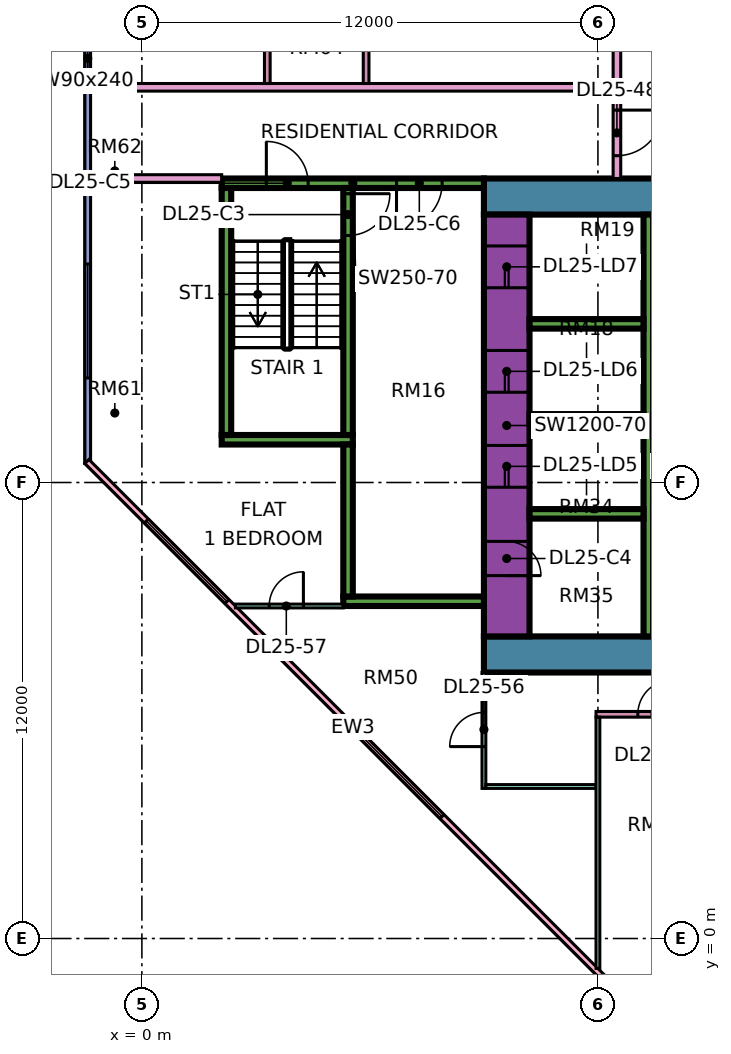
"""IFC4 building model, lengths in metres.
Left out: names, types, materials, properties, quantities, classifications, styles, units other than length and angle.
Written with IfcOpenShell. Run it as: python <this file> out.ifc"""

import sys

from ifc_helpers import new_model, si_unit, direction, frame, frame_2d, origin, place, context, subcontext, project, spatial, rectangle, extrude, element, fill, save


model = new_model("IFC4")
c1 = context("Model", 3, precision=1e-05, world=origin(), true_north=direction((0.0, 1.0)))
c2 = subcontext(c1, "Body", "Model", "MODEL_VIEW")
j1 = project(units=[si_unit("LENGTHUNIT", "METRE"), si_unit("PLANEANGLEUNIT", "RADIAN")], contexts=[c1])
p1 = place(None, origin())
s1 = spatial("IfcSite", under=j1, at=p1, CompositionType="ELEMENT")
p2 = place(p1, origin())
s2 = spatial("IfcBuilding", under=s1, at=p2, CompositionType="ELEMENT")
p3 = place(p2, frame((0.0, 0.0, 110.65)))
s3 = spatial("IfcBuildingStorey", under=s2, at=p3, CompositionType="ELEMENT", Elevation=110.65)
p4 = place(p3, frame((9.0, 7.475, 0.0), z_axis=(0.0, 0.0, 1.0), x_axis=(1.0, 0.0, 0.0)))
e1 = element("IfcWall", 1, at=p4, inside=s3, PredefinedType="SHEAR", context=c2, shape_type="SweptSolid", body=[
    extrude(rectangle(XDim=25.0, YDim=0.95, at=frame_2d((12.5, 0.0))), origin(), (0.0, 0.0, 1.0), 3.75),
])
p5 = place(p3, frame((9.0, 19.525, 0.0), z_axis=(0.0, 0.0, 1.0), x_axis=(1.0, 0.0, 0.0)))
e2 = element("IfcWall", 2, at=p5, inside=s3, PredefinedType="SHEAR", context=c2, shape_type="SweptSolid", body=[
    extrude(rectangle(XDim=25.0, YDim=0.95, at=frame_2d((12.5, 0.0))), origin(), (0.0, 0.0, 1.0), 3.75),
])
p6 = place(p5, frame((19.1, 0.0, 0.0)))
e3 = element("IfcOpeningElement", 3, at=p6, cuts=e2, PredefinedType="OPENING", context=c2, shape_type="SweptSolid", body=[
    extrude(rectangle(XDim=1.8, YDim=2.4, at=frame_2d((0.9, 1.2))), frame((0.0, 0.485, 0.0), z_axis=(0.0, -1.0, 0.0), x_axis=(1.0, 0.0, 0.0)), (0.0, 0.0, 1.0), 0.97),
])
p7 = place(p3, frame((9.6, 7.95, 0.0), z_axis=(0.0, 0.0, 1.0), x_axis=(0.0, 1.0, 0.0)))
e4 = element("IfcWall", 4, at=p7, inside=s3, PredefinedType="SHEAR", context=c2, shape_type="SweptSolid", body=[
    extrude(rectangle(XDim=11.1, YDim=1.2, at=frame_2d((5.55, 0.0))), origin(), (0.0, 0.0, 1.0), 3.75),
])
p8 = place(p7, frame((3.925, 0.0, 0.0)))
e5 = element("IfcOpeningElement", 5, at=p8, cuts=e4, PredefinedType="OPENING", context=c2, shape_type="SweptSolid", body=[
    extrude(rectangle(XDim=1.1, YDim=2.2, at=frame_2d((0.55, 1.1))), frame((0.0, 0.61, 0.0), z_axis=(0.0, -1.0, 0.0), x_axis=(1.0, 0.0, 0.0)), (0.0, 0.0, 1.0), 1.22),
])
p9 = place(p7, frame((6.425, 0.0, 0.0)))
e6 = element("IfcOpeningElement", 6, at=p9, cuts=e4, PredefinedType="OPENING", context=c2, shape_type="SweptSolid", body=[
    extrude(rectangle(XDim=1.1, YDim=2.2, at=frame_2d((0.55, 1.1))), frame((0.0, 0.61, 0.0), z_axis=(0.0, -1.0, 0.0), x_axis=(1.0, 0.0, 0.0)), (0.0, 0.0, 1.0), 1.22),
])
p10 = place(p7, frame((9.175, 0.0, 0.0)))
e7 = element("IfcOpeningElement", 7, at=p10, cuts=e4, PredefinedType="OPENING", context=c2, shape_type="SweptSolid", body=[
    extrude(rectangle(XDim=1.1, YDim=2.2, at=frame_2d((0.55, 1.1))), frame((0.0, 0.61, 0.0), z_axis=(0.0, -1.0, 0.0), x_axis=(1.0, 0.0, 0.0)), (0.0, 0.0, 1.0), 1.22),
])
p11 = place(p7, frame((1.6, 0.0, 0.0)))
e8 = element("IfcOpeningElement", 8, at=p11, cuts=e4, PredefinedType="OPENING", context=c2, shape_type="SweptSolid", body=[
    extrude(rectangle(XDim=0.9, YDim=2.1, at=frame_2d((0.45, 1.05))), frame((0.0, 0.61, 0.0), z_axis=(0.0, -1.0, 0.0), x_axis=(1.0, 0.0, 0.0)), (0.0, 0.0, 1.0), 1.22),
])
p12 = place(p3, frame((13.325, 7.95, 0.0), z_axis=(0.0, 0.0, 1.0), x_axis=(0.0, 1.0, 0.0)))
e9 = element("IfcWall", 9, at=p12, inside=s3, PredefinedType="SHEAR", context=c2, shape_type="SweptSolid", body=[
    extrude(rectangle(XDim=11.1, YDim=0.25, at=frame_2d((5.55, 0.0))), origin(), (0.0, 0.0, 1.0), 3.75),
])
for number, where, z_axis, x_axis in (
    (10, (10.2, 11.175, 0.0), (0.0, 0.0, 1.0), (1.0, 0.0, 0.0)),
    (11, (10.2, 13.675, 0.0), (0.0, 0.0, 1.0), (1.0, 0.0, 0.0)),
    (12, (10.2, 16.175, 0.0), (0.0, 0.0, 1.0), (1.0, 0.0, 0.0)),
):
    element("IfcWall", number, at=place(p3, frame(where, z_axis=z_axis, x_axis=x_axis)), inside=s3, PredefinedType="SHEAR", context=c2, shape_type="SweptSolid", body=[
        extrude(rectangle(XDim=3.0, YDim=0.25, at=frame_2d((1.5, 0.0))), origin(), (0.0, 0.0, 1.0), 3.75),
    ])
p13 = place(p3, frame((2.1, 19.875, 0.0), z_axis=(0.0, 0.0, 1.0), x_axis=(1.0, 0.0, 0.0)))
e13 = element("IfcWall", 13, at=p13, inside=s3, PredefinedType="SHEAR", context=c2, shape_type="SweptSolid", body=[
    extrude(rectangle(XDim=6.9, YDim=0.25, at=frame_2d((3.45, 0.0))), origin(), (0.0, 0.0, 1.0), 3.75),
])
p14 = place(p13, frame((1.175, 0.0, 0.0)))
e14 = element("IfcOpeningElement", 14, at=p14, cuts=e13, PredefinedType="OPENING", context=c2, shape_type="SweptSolid", body=[
    extrude(rectangle(XDim=1.1, YDim=2.2, at=frame_2d((0.55, 1.1))), frame((0.0, 0.135, 0.0), z_axis=(0.0, -1.0, 0.0), x_axis=(1.0, 0.0, 0.0)), (0.0, 0.0, 1.0), 0.27),
])
p15 = place(p13, frame((4.6, 0.0, 0.0)))
e15 = element("IfcOpeningElement", 15, at=p15, cuts=e13, PredefinedType="OPENING", context=c2, shape_type="SweptSolid", body=[
    extrude(rectangle(XDim=1.2, YDim=2.2, at=frame_2d((0.6, 1.1))), frame((0.0, 0.135, 0.0), z_axis=(0.0, -1.0, 0.0), x_axis=(1.0, 0.0, 0.0)), (0.0, 0.0, 1.0), 0.27),
])
p16 = place(p3, frame((2.1, 13.125, 0.0), z_axis=(0.0, 0.0, 1.0), x_axis=(1.0, 0.0, 0.0)))
e16 = element("IfcWall", 16, at=p16, inside=s3, PredefinedType="SHEAR", context=c2, shape_type="SweptSolid", body=[
    extrude(rectangle(XDim=3.45, YDim=0.25, at=frame_2d((1.725, 0.0))), origin(), (0.0, 0.0, 1.0), 3.75),
])
p17 = place(p3, frame((2.225, 13.25, 0.0), z_axis=(0.0, 0.0, 1.0), x_axis=(0.0, 1.0, 0.0)))
e17 = element("IfcWall", 17, at=p17, inside=s3, PredefinedType="SHEAR", context=c2, shape_type="SweptSolid", body=[
    extrude(rectangle(XDim=6.5, YDim=0.25, at=frame_2d((3.25, 0.0))), origin(), (0.0, 0.0, 1.0), 3.75),
])
p18 = place(p3, frame((5.425, 13.25, 0.0), z_axis=(0.0, 0.0, 1.0), x_axis=(0.0, 1.0, 0.0)))
e18 = element("IfcWall", 18, at=p18, inside=s3, PredefinedType="SHEAR", context=c2, shape_type="SweptSolid", body=[
    extrude(rectangle(XDim=6.5, YDim=0.25, at=frame_2d((3.25, 0.0))), origin(), (0.0, 0.0, 1.0), 3.75),
])
p19 = place(p18, frame((5.25, 0.0, 0.0)))
e19 = element("IfcOpeningElement", 19, at=p19, cuts=e18, PredefinedType="OPENING", context=c2, shape_type="SweptSolid", body=[
    extrude(rectangle(XDim=1.1, YDim=2.2, at=frame_2d((0.55, 1.1))), frame((0.0, 0.135, 0.0), z_axis=(0.0, -1.0, 0.0), x_axis=(1.0, 0.0, 0.0)), (0.0, 0.0, 1.0), 0.27),
])
p20 = place(p3, frame((5.3, 8.875, 0.0), z_axis=(0.0, 0.0, 1.0), x_axis=(1.0, 0.0, 0.0)))
e20 = element("IfcWall", 20, at=p20, inside=s3, PredefinedType="SHEAR", context=c2, shape_type="SweptSolid", body=[
    extrude(rectangle(XDim=3.7, YDim=0.25, at=frame_2d((1.85, 0.0))), origin(), (0.0, 0.0, 1.0), 3.75),
])
p21 = place(p3, frame((5.425, 9.0, 0.0), z_axis=(0.0, 0.0, 1.0), x_axis=(0.0, 1.0, 0.0)))
e21 = element("IfcWall", 21, at=p21, inside=s3, PredefinedType="SHEAR", context=c2, shape_type="SweptSolid", body=[
    extrude(rectangle(XDim=4.0, YDim=0.25, at=frame_2d((2.0, 0.0))), origin(), (0.0, 0.0, 1.0), 3.75),
])
p22 = place(p3, frame((-1.425, 23.925, 0.0), z_axis=(0.0, 0.0, 1.0), x_axis=(0.0, -1.0, 0.0)))
e22 = element("IfcWall", 22, at=p22, inside=s3, PredefinedType="SOLIDWALL", context=c2, shape_type="SweptSolid", body=[
    extrude(rectangle(XDim=11.425, YDim=0.15, at=frame_2d((5.712, 0.0))), origin(), (0.0, 0.0, 1.0), 3.35),
])
p23 = place(p22, frame((0.312, 0.0, 0.45)))
e23 = element("IfcOpeningElement", 23, at=p23, cuts=e22, PredefinedType="OPENING", context=c2, shape_type="SweptSolid", body=[
    extrude(rectangle(XDim=0.9, YDim=2.4, at=frame_2d((0.45, 1.2))), frame((0.0, 0.085, 0.0), z_axis=(0.0, -1.0, 0.0), x_axis=(1.0, 0.0, 0.0)), (0.0, 0.0, 1.0), 0.17),
])
p24 = place(p22, frame((6.175, 0.0, 0.45)))
e24 = element("IfcOpeningElement", 24, at=p24, cuts=e22, PredefinedType="OPENING", context=c2, shape_type="SweptSolid", body=[
    extrude(rectangle(XDim=3.0, YDim=2.4, at=frame_2d((1.5, 1.2))), frame((0.0, 0.085, 0.0), z_axis=(0.0, -1.0, 0.0), x_axis=(1.0, 0.0, 0.0)), (0.0, 0.0, 1.0), 0.17),
])
p25 = place(p3, frame((-1.447, 12.553, 0.0), z_axis=(0.0, 0.0, 1.0), x_axis=(0.707106781187, -0.707106781187, 0.0)))
e25 = element("IfcWall", 25, at=p25, inside=s3, PredefinedType="SOLIDWALL", context=c2, shape_type="SweptSolid", body=[
    extrude(rectangle(XDim=19.799, YDim=0.15, at=frame_2d((9.899, 0.0))), origin(), (0.0, 0.0, 1.0), 3.35),
])
p26 = place(p25, frame((2.212, 0.0, 0.45)))
e26 = element("IfcOpeningElement", 26, at=p26, cuts=e25, PredefinedType="OPENING", context=c2, shape_type="SweptSolid", body=[
    extrude(rectangle(XDim=3.0, YDim=2.4, at=frame_2d((1.5, 1.2))), frame((0.0, 0.085, 0.0), z_axis=(0.0, -1.0, 0.0), x_axis=(1.0, 0.0, 0.0)), (0.0, 0.0, 1.0), 0.17),
])
p27 = place(p25, frame((10.216, 0.0, 0.45)))
e27 = element("IfcOpeningElement", 27, at=p27, cuts=e25, PredefinedType="OPENING", context=c2, shape_type="SweptSolid", body=[
    extrude(rectangle(XDim=3.0, YDim=2.4, at=frame_2d((1.5, 1.2))), frame((0.0, 0.085, 0.0), z_axis=(0.0, -1.0, 0.0), x_axis=(1.0, 0.0, 0.0)), (0.0, 0.0, 1.0), 0.17),
])
p28 = place(p3, frame((-1.35, 20.0, 0.0), z_axis=(0.0, 0.0, 1.0), x_axis=(1.0, 0.0, 0.0)))
e28 = element("IfcWall", 28, at=p28, inside=s3, PredefinedType="PARTITIONING", context=c2, shape_type="SweptSolid", body=[
    extrude(rectangle(XDim=3.45, YDim=0.2, at=frame_2d((1.725, 0.0))), origin(), (0.0, 0.0, 1.0), 3.35),
])
p29 = place(p3, frame((-1.35, 22.4, 0.0), z_axis=(0.0, 0.0, 1.0), x_axis=(1.0, 0.0, 0.0)))
e29 = element("IfcWall", 29, at=p29, inside=s3, PredefinedType="PARTITIONING", context=c2, shape_type="SweptSolid", body=[
    extrude(rectangle(XDim=13.75, YDim=0.2, at=frame_2d((6.875, 0.0))), origin(), (0.0, 0.0, 1.0), 3.35),
])
p30 = place(p3, frame((2.461, 8.75, 0.0), z_axis=(0.0, 0.0, 1.0), x_axis=(1.0, 0.0, 0.0)))
e30 = element("IfcWall", 30, at=p30, inside=s3, PredefinedType="PARTITIONING", context=c2, shape_type="SweptSolid", body=[
    extrude(rectangle(XDim=2.839, YDim=0.1, at=frame_2d((1.419, 0.0))), origin(), (0.0, 0.0, 1.0), 3.35),
])
p31 = place(p30, frame((0.889, 0.0, 0.0)))
e31 = element("IfcOpeningElement", 31, at=p31, cuts=e30, PredefinedType="OPENING", context=c2, shape_type="SweptSolid", body=[
    extrude(rectangle(XDim=0.9, YDim=2.1, at=frame_2d((0.45, 1.05))), frame((0.0, 0.06, 0.0), z_axis=(0.0, -1.0, 0.0), x_axis=(1.0, 0.0, 0.0)), (0.0, 0.0, 1.0), 0.12),
])
p32 = place(p3, frame((3.3, 22.5, 0.0), z_axis=(0.0, 0.0, 1.0), x_axis=(0.0, 1.0, 0.0)))
e32 = element("IfcWall", 32, at=p32, inside=s3, PredefinedType="PARTITIONING", context=c2, shape_type="SweptSolid", body=[
    extrude(rectangle(XDim=2.975, YDim=0.15, at=frame_2d((1.488, 0.0))), origin(), (0.0, 0.0, 1.0), 3.35),
])
p33 = place(p3, frame((5.9, 22.5, 0.0), z_axis=(0.0, 0.0, 1.0), x_axis=(0.0, 1.0, 0.0)))
e33 = element("IfcWall", 33, at=p33, inside=s3, PredefinedType="PARTITIONING", context=c2, shape_type="SweptSolid", body=[
    extrude(rectangle(XDim=7.55, YDim=0.15, at=frame_2d((3.775, 0.0))), origin(), (0.0, 0.0, 1.0), 3.35),
])
p34 = place(p3, frame((9.0, 3.95, 0.0), z_axis=(0.0, 0.0, 1.0), x_axis=(0.0, 1.0, 0.0)))
e34 = element("IfcWall", 34, at=p34, inside=s3, PredefinedType="PARTITIONING", context=c2, shape_type="SweptSolid", body=[
    extrude(rectangle(XDim=3.05, YDim=0.1, at=frame_2d((1.525, 0.0))), origin(), (0.0, 0.0, 1.0), 3.35),
])
p35 = place(p34, frame((1.1, 0.0, 0.0)))
e35 = element("IfcOpeningElement", 35, at=p35, cuts=e34, PredefinedType="OPENING", context=c2, shape_type="SweptSolid", body=[
    extrude(rectangle(XDim=0.9, YDim=2.1, at=frame_2d((0.45, 1.05))), frame((0.0, 0.06, 0.0), z_axis=(0.0, -1.0, 0.0), x_axis=(1.0, 0.0, 0.0)), (0.0, 0.0, 1.0), 0.12),
])
p36 = place(p3, frame((9.05, 4.0, 0.0), z_axis=(0.0, 0.0, 1.0), x_axis=(1.0, 0.0, 0.0)))
e36 = element("IfcWall", 36, at=p36, inside=s3, PredefinedType="PARTITIONING", context=c2, shape_type="SweptSolid", body=[
    extrude(rectangle(XDim=2.9, YDim=0.1, at=frame_2d((1.45, 0.0))), origin(), (0.0, 0.0, 1.0), 3.35),
])
p37 = place(p3, frame((11.95, 5.9, 0.0), z_axis=(0.0, 0.0, 1.0), x_axis=(1.0, 0.0, 0.0)))
e37 = element("IfcWall", 37, at=p37, inside=s3, PredefinedType="PARTITIONING", context=c2, shape_type="SweptSolid", body=[
    extrude(rectangle(XDim=21.1, YDim=0.15, at=frame_2d((10.55, 0.0))), origin(), (0.0, 0.0, 1.0), 3.35),
])
p38 = place(p37, frame((1.1, 0.0, 0.0)))
e38 = element("IfcOpeningElement", 38, at=p38, cuts=e37, PredefinedType="OPENING", context=c2, shape_type="SweptSolid", body=[
    extrude(rectangle(XDim=0.9, YDim=2.1, at=frame_2d((0.45, 1.05))), frame((0.0, 0.085, 0.0), z_axis=(0.0, -1.0, 0.0), x_axis=(1.0, 0.0, 0.0)), (0.0, 0.0, 1.0), 0.17),
])
p39 = place(p37, frame((4.1, 0.0, 0.0)))
e39 = element("IfcOpeningElement", 39, at=p39, cuts=e37, PredefinedType="OPENING", context=c2, shape_type="SweptSolid", body=[
    extrude(rectangle(XDim=0.9, YDim=2.1, at=frame_2d((0.45, 1.05))), frame((0.0, 0.085, 0.0), z_axis=(0.0, -1.0, 0.0), x_axis=(1.0, 0.0, 0.0)), (0.0, 0.0, 1.0), 0.17),
])
p40 = place(p37, frame((10.1, 0.0, 0.0)))
e40 = element("IfcOpeningElement", 40, at=p40, cuts=e37, PredefinedType="OPENING", context=c2, shape_type="SweptSolid", body=[
    extrude(rectangle(XDim=0.9, YDim=2.1, at=frame_2d((0.45, 1.05))), frame((0.0, 0.085, 0.0), z_axis=(0.0, -1.0, 0.0), x_axis=(1.0, 0.0, 0.0)), (0.0, 0.0, 1.0), 0.17),
])
p41 = place(p37, frame((16.1, 0.0, 0.0)))
e41 = element("IfcOpeningElement", 41, at=p41, cuts=e37, PredefinedType="OPENING", context=c2, shape_type="SweptSolid", body=[
    extrude(rectangle(XDim=0.9, YDim=2.1, at=frame_2d((0.45, 1.05))), frame((0.0, 0.085, 0.0), z_axis=(0.0, -1.0, 0.0), x_axis=(1.0, 0.0, 0.0)), (0.0, 0.0, 1.0), 0.17),
])
p42 = place(p3, frame((12.0, -0.788, 0.0), z_axis=(0.0, 0.0, 1.0), x_axis=(0.0, 1.0, 0.0)))
e42 = element("IfcWall", 42, at=p42, inside=s3, PredefinedType="PARTITIONING", context=c2, shape_type="SweptSolid", body=[
    extrude(rectangle(XDim=6.613, YDim=0.1, at=frame_2d((3.306, 0.0))), origin(), (0.0, 0.0, 1.0), 3.35),
])
p43 = place(p3, frame((12.5, 20.0, 0.0), z_axis=(0.0, 0.0, 1.0), x_axis=(0.0, 1.0, 0.0)))
e43 = element("IfcWall", 43, at=p43, inside=s3, PredefinedType="PARTITIONING", context=c2, shape_type="SweptSolid", body=[
    extrude(rectangle(XDim=43.0, YDim=0.2, at=frame_2d((21.5, 0.0))), origin(), (0.0, 0.0, 1.0), 3.35),
])
p44 = place(p43, frame((25.95, 0.0, 0.0)))
e44 = element("IfcOpeningElement", 44, at=p44, cuts=e43, PredefinedType="OPENING", context=c2, shape_type="SweptSolid", body=[
    extrude(rectangle(XDim=1.0, YDim=2.1, at=frame_2d((0.5, 1.05))), frame((0.0, 0.11, 0.0), z_axis=(0.0, -1.0, 0.0), x_axis=(1.0, 0.0, 0.0)), (0.0, 0.0, 1.0), 0.22),
])
p45 = place(p43, frame((29.25, 0.0, 0.0)))
e45 = element("IfcOpeningElement", 45, at=p45, cuts=e43, PredefinedType="OPENING", context=c2, shape_type="SweptSolid", body=[
    extrude(rectangle(XDim=1.0, YDim=2.1, at=frame_2d((0.5, 1.05))), frame((0.0, 0.11, 0.0), z_axis=(0.0, -1.0, 0.0), x_axis=(1.0, 0.0, 0.0)), (0.0, 0.0, 1.0), 0.22),
])
p46 = place(p43, frame((0.6, 0.0, 0.0)))
e46 = element("IfcOpeningElement", 46, at=p46, cuts=e43, PredefinedType="OPENING", context=c2, shape_type="SweptSolid", body=[
    extrude(rectangle(XDim=1.2, YDim=2.1, at=frame_2d((0.6, 1.05))), frame((0.0, 0.11, 0.0), z_axis=(0.0, -1.0, 0.0), x_axis=(1.0, 0.0, 0.0)), (0.0, 0.0, 1.0), 0.22),
])
p47 = place(p43, frame((4.65, 0.0, 0.0)))
e47 = element("IfcOpeningElement", 47, at=p47, cuts=e43, PredefinedType="OPENING", context=c2, shape_type="SweptSolid", body=[
    extrude(rectangle(XDim=1.0, YDim=2.1, at=frame_2d((0.5, 1.05))), frame((0.0, 0.11, 0.0), z_axis=(0.0, -1.0, 0.0), x_axis=(1.0, 0.0, 0.0)), (0.0, 0.0, 1.0), 0.22),
])
p48 = place(p23, origin())
e48 = element("IfcWindow", 48, at=p48, inside=s3, PartitioningType="SINGLE_PANEL", PredefinedType="WINDOW", context=c2, shape_type="SweptSolid", body=[
    extrude(rectangle(XDim=0.9, YDim=2.4, at=frame_2d((0.45, 1.2))), frame((0.0, 0.03, 0.0), z_axis=(0.0, -1.0, 0.0), x_axis=(1.0, 0.0, 0.0)), (0.0, 0.0, 1.0), 0.06),
])
fill(e23, e48)
p49 = place(p24, origin())
e49 = element("IfcWindow", 49, at=p49, inside=s3, PartitioningType="SINGLE_PANEL", PredefinedType="WINDOW", context=c2, shape_type="SweptSolid", body=[
    extrude(rectangle(XDim=3.0, YDim=2.4, at=frame_2d((1.5, 1.2))), frame((0.0, 0.03, 0.0), z_axis=(0.0, -1.0, 0.0), x_axis=(1.0, 0.0, 0.0)), (0.0, 0.0, 1.0), 0.06),
])
fill(e24, e49)
p50 = place(p26, origin())
e50 = element("IfcWindow", 50, at=p50, inside=s3, PartitioningType="SINGLE_PANEL", PredefinedType="WINDOW", context=c2, shape_type="SweptSolid", body=[
    extrude(rectangle(XDim=3.0, YDim=2.4, at=frame_2d((1.5, 1.2))), frame((0.0, 0.03, 0.0), z_axis=(0.0, -1.0, 0.0), x_axis=(1.0, 0.0, 0.0)), (0.0, 0.0, 1.0), 0.06),
])
fill(e26, e50)
p51 = place(p27, origin())
e51 = element("IfcWindow", 51, at=p51, inside=s3, PartitioningType="SINGLE_PANEL", PredefinedType="WINDOW", context=c2, shape_type="SweptSolid", body=[
    extrude(rectangle(XDim=3.0, YDim=2.4, at=frame_2d((1.5, 1.2))), frame((0.0, 0.03, 0.0), z_axis=(0.0, -1.0, 0.0), x_axis=(1.0, 0.0, 0.0)), (0.0, 0.0, 1.0), 0.06),
])
fill(e27, e51)
p52 = place(p8, origin())
e52 = element("IfcDoor", 52, at=p52, inside=s3, OperationType="DOUBLE_DOOR_SLIDING", PredefinedType="DOOR", context=c2, shape_type="SweptSolid", body=[
    extrude(rectangle(XDim=1.1, YDim=2.2, at=frame_2d((0.55, 1.1))), frame((0.0, 0.025, 0.0), z_axis=(0.0, -1.0, 0.0), x_axis=(1.0, 0.0, 0.0)), (0.0, 0.0, 1.0), 0.05),
])
fill(e5, e52)
p53 = place(p9, origin())
e53 = element("IfcDoor", 53, at=p53, inside=s3, OperationType="DOUBLE_DOOR_SLIDING", PredefinedType="DOOR", context=c2, shape_type="SweptSolid", body=[
    extrude(rectangle(XDim=1.1, YDim=2.2, at=frame_2d((0.55, 1.1))), frame((0.0, 0.025, 0.0), z_axis=(0.0, -1.0, 0.0), x_axis=(1.0, 0.0, 0.0)), (0.0, 0.0, 1.0), 0.05),
])
fill(e6, e53)
p54 = place(p10, origin())
e54 = element("IfcDoor", 54, at=p54, inside=s3, OperationType="DOUBLE_DOOR_SLIDING", PredefinedType="DOOR", context=c2, shape_type="SweptSolid", body=[
    extrude(rectangle(XDim=1.1, YDim=2.2, at=frame_2d((0.55, 1.1))), frame((0.0, 0.025, 0.0), z_axis=(0.0, -1.0, 0.0), x_axis=(1.0, 0.0, 0.0)), (0.0, 0.0, 1.0), 0.05),
])
fill(e7, e54)
p55 = place(p19, origin())
e55 = element("IfcDoor", 55, at=p55, inside=s3, OperationType="SINGLE_SWING_RIGHT", PredefinedType="DOOR", context=c2, shape_type="SweptSolid", body=[
    extrude(rectangle(XDim=1.1, YDim=2.2, at=frame_2d((0.55, 1.1))), frame((0.0, 0.025, 0.0), z_axis=(0.0, -1.0, 0.0), x_axis=(1.0, 0.0, 0.0)), (0.0, 0.0, 1.0), 0.05),
])
fill(e19, e55)
p56 = place(p11, frame((0.9, 0.0, 0.0), z_axis=(0.0, 0.0, 1.0), x_axis=(-1.0, 0.0, 0.0)))
e56 = element("IfcDoor", 56, at=p56, inside=s3, OperationType="SINGLE_SWING_LEFT", PredefinedType="DOOR", context=c2, shape_type="SweptSolid", body=[
    extrude(rectangle(XDim=0.9, YDim=2.1, at=frame_2d((0.45, 1.05))), frame((0.0, 0.025, 0.0), z_axis=(0.0, -1.0, 0.0), x_axis=(1.0, 0.0, 0.0)), (0.0, 0.0, 1.0), 0.05),
])
fill(e8, e56)
p57 = place(p14, origin())
e57 = element("IfcDoor", 57, at=p57, inside=s3, OperationType="SINGLE_SWING_LEFT", PredefinedType="DOOR", context=c2, shape_type="SweptSolid", body=[
    extrude(rectangle(XDim=1.1, YDim=2.2, at=frame_2d((0.55, 1.1))), frame((0.0, 0.025, 0.0), z_axis=(0.0, -1.0, 0.0), x_axis=(1.0, 0.0, 0.0)), (0.0, 0.0, 1.0), 0.05),
])
fill(e14, e57)
p58 = place(p15, frame((1.2, 0.0, 0.0), z_axis=(0.0, 0.0, 1.0), x_axis=(-1.0, 0.0, 0.0)))
e58 = element("IfcDoor", 58, at=p58, inside=s3, OperationType="SINGLE_SWING_LEFT", PredefinedType="DOOR", context=c2, shape_type="SweptSolid", body=[
    extrude(rectangle(XDim=1.2, YDim=2.2, at=frame_2d((0.6, 1.1))), frame((0.0, 0.025, 0.0), z_axis=(0.0, -1.0, 0.0), x_axis=(1.0, 0.0, 0.0)), (0.0, 0.0, 1.0), 0.05),
])
fill(e15, e58)
p59 = place(p46, origin())
e59 = element("IfcDoor", 59, at=p59, inside=s3, OperationType="SINGLE_SWING_RIGHT", PredefinedType="DOOR", context=c2, shape_type="SweptSolid", body=[
    extrude(rectangle(XDim=1.2, YDim=2.1, at=frame_2d((0.6, 1.05))), frame((0.0, 0.025, 0.0), z_axis=(0.0, -1.0, 0.0), x_axis=(1.0, 0.0, 0.0)), (0.0, 0.0, 1.0), 0.05),
])
fill(e46, e59)
p60 = place(p38, frame((0.9, 0.0, 0.0), z_axis=(0.0, 0.0, 1.0), x_axis=(-1.0, 0.0, 0.0)))
e60 = element("IfcDoor", 60, at=p60, inside=s3, OperationType="SINGLE_SWING_RIGHT", PredefinedType="DOOR", context=c2, shape_type="SweptSolid", body=[
    extrude(rectangle(XDim=0.9, YDim=2.1, at=frame_2d((0.45, 1.05))), frame((0.0, 0.025, 0.0), z_axis=(0.0, -1.0, 0.0), x_axis=(1.0, 0.0, 0.0)), (0.0, 0.0, 1.0), 0.05),
])
fill(e38, e60)
p61 = place(p35, origin())
e61 = element("IfcDoor", 61, at=p61, inside=s3, OperationType="SINGLE_SWING_LEFT", PredefinedType="DOOR", context=c2, shape_type="SweptSolid", body=[
    extrude(rectangle(XDim=0.9, YDim=2.1, at=frame_2d((0.45, 1.05))), frame((0.0, 0.025, 0.0), z_axis=(0.0, -1.0, 0.0), x_axis=(1.0, 0.0, 0.0)), (0.0, 0.0, 1.0), 0.05),
])
fill(e35, e61)
p62 = place(p31, frame((0.9, 0.0, 0.0), z_axis=(0.0, 0.0, 1.0), x_axis=(-1.0, 0.0, 0.0)))
e62 = element("IfcDoor", 62, at=p62, inside=s3, OperationType="SINGLE_SWING_RIGHT", PredefinedType="DOOR", context=c2, shape_type="SweptSolid", body=[
    extrude(rectangle(XDim=0.9, YDim=2.1, at=frame_2d((0.45, 1.05))), frame((0.0, 0.025, 0.0), z_axis=(0.0, -1.0, 0.0), x_axis=(1.0, 0.0, 0.0)), (0.0, 0.0, 1.0), 0.05),
])
fill(e31, e62)
save(model, sys.argv[1])
